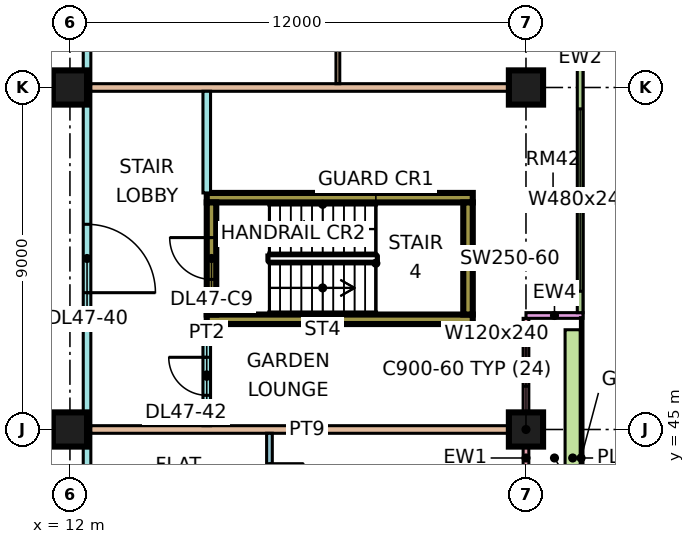
"""IFC4 building model, lengths in metres.
Left out: names, types, materials, properties, quantities, classifications, styles, units other than length and angle.
Written with IfcOpenShell. Run it as: python <this file> out.ifc"""

import sys

from ifc_helpers import new_model, si_unit, direction, frame, frame_2d, origin, origin_2d, place, context, subcontext, project, spatial, rectangle, extrude, element, fill, save


model = new_model("IFC4")
c1 = context("Model", 3, precision=1e-05, world=origin(), true_north=direction((0.0, 1.0)))
c2 = subcontext(c1, "Body", "Model", "MODEL_VIEW")
j1 = project(units=[si_unit("LENGTHUNIT", "METRE"), si_unit("PLANEANGLEUNIT", "RADIAN")], contexts=[c1])
p1 = place(None, origin())
s1 = spatial("IfcSite", under=j1, at=p1, CompositionType="ELEMENT")
p2 = place(p1, origin())
s2 = spatial("IfcBuilding", under=s1, at=p2, CompositionType="ELEMENT")
p3 = place(p2, frame((0.0, 0.0, 202.4)))
s3 = spatial("IfcBuildingStorey", under=s2, at=p3, CompositionType="ELEMENT", Elevation=202.4)
for number, where, z_axis, x_axis in (
    (1, (12.0, 45.0, 0.0), (0.0, 0.0, 1.0), (1.0, 0.0, 0.0)),
    (2, (12.0, 54.0, 0.0), (0.0, 0.0, 1.0), (1.0, 0.0, 0.0)),
    (3, (24.0, 45.0, 0.0), (0.0, 0.0, 1.0), (1.0, 0.0, 0.0)),
    (4, (24.0, 54.0, 0.0), (0.0, 0.0, 1.0), (1.0, 0.0, 0.0)),
):
    element("IfcColumn", number, at=place(p3, frame(where, z_axis=z_axis, x_axis=x_axis)), inside=s3, PredefinedType="COLUMN", context=c2, shape_type="SweptSolid", body=[
        extrude(rectangle(XDim=0.9, YDim=0.9, at=origin_2d()), origin(), (0.0, 0.0, 1.0), 3.75),
    ])
for number, where, z_axis, x_axis in (
    (5, (15.6, 47.9, 0.0), (0.0, 0.0, 1.0), (1.0, 0.0, 0.0)),
    (6, (15.6, 51.1, 0.0), (0.0, 0.0, 1.0), (1.0, 0.0, 0.0)),
):
    element("IfcWall", number, at=place(p3, frame(where, z_axis=z_axis, x_axis=x_axis)), inside=s3, PredefinedType="SHEAR", context=c2, shape_type="SweptSolid", body=[
        extrude(rectangle(XDim=7.0, YDim=0.25, at=frame_2d((3.5, 0.0))), origin(), (0.0, 0.0, 1.0), 3.75),
    ])
p4 = place(p3, frame((15.725, 48.025, 0.0), z_axis=(0.0, 0.0, 1.0), x_axis=(0.0, 1.0, 0.0)))
e7 = element("IfcWall", 7, at=p4, inside=s3, PredefinedType="SHEAR", context=c2, shape_type="SweptSolid", body=[
    extrude(rectangle(XDim=2.95, YDim=0.25, at=frame_2d((1.475, 0.0))), origin(), (0.0, 0.0, 1.0), 3.75),
])
p5 = place(p4, frame((0.925, 0.0, 0.0)))
e8 = element("IfcOpeningElement", 8, at=p5, cuts=e7, PredefinedType="OPENING", context=c2, shape_type="SweptSolid", body=[
    extrude(rectangle(XDim=1.1, YDim=2.2, at=frame_2d((0.55, 1.1))), frame((0.0, 0.135, 0.0), z_axis=(0.0, -1.0, 0.0), x_axis=(1.0, 0.0, 0.0)), (0.0, 0.0, 1.0), 0.27),
])
p6 = place(p3, frame((22.475, 48.025, 0.0), z_axis=(0.0, 0.0, 1.0), x_axis=(0.0, 1.0, 0.0)))
e9 = element("IfcWall", 9, at=p6, inside=s3, PredefinedType="SHEAR", context=c2, shape_type="SweptSolid", body=[
    extrude(rectangle(XDim=2.95, YDim=0.25, at=frame_2d((1.475, 0.0))), origin(), (0.0, 0.0, 1.0), 3.75),
])
p7 = place(p3, frame((24.0, 40.575, 0.0), z_axis=(0.0, 0.0, 1.0), x_axis=(0.0, 1.0, 0.0)))
e10 = element("IfcWall", 10, at=p7, inside=s3, PredefinedType="SOLIDWALL", context=c2, shape_type="SweptSolid", body=[
    extrude(rectangle(XDim=7.35, YDim=0.15, at=frame_2d((3.675, 0.0))), origin(), (0.0, 0.0, 1.0), 3.3),
])
p8 = place(p7, frame((0.262, 0.0, 0.45)))
e11 = element("IfcOpeningElement", 11, at=p8, cuts=e10, PredefinedType="OPENING", context=c2, shape_type="SweptSolid", body=[
    extrude(rectangle(XDim=0.9, YDim=2.4, at=frame_2d((0.45, 1.2))), frame((0.0, 0.085, 0.0), z_axis=(0.0, -1.0, 0.0), x_axis=(1.0, 0.0, 0.0)), (0.0, 0.0, 1.0), 0.17),
])
p9 = place(p7, frame((2.05, 0.0, 0.0)))
e12 = element("IfcOpeningElement", 12, at=p9, cuts=e10, PredefinedType="OPENING", context=c2, shape_type="SweptSolid", body=[
    extrude(rectangle(XDim=1.2, YDim=2.4, at=frame_2d((0.6, 1.2))), frame((0.0, 0.085, 0.0), z_axis=(0.0, -1.0, 0.0), x_axis=(1.0, 0.0, 0.0)), (0.0, 0.0, 1.0), 0.17),
])
p10 = place(p7, frame((5.562, 0.0, 0.45)))
e13 = element("IfcOpeningElement", 13, at=p10, cuts=e10, PredefinedType="OPENING", context=c2, shape_type="SweptSolid", body=[
    extrude(rectangle(XDim=1.2, YDim=2.4, at=frame_2d((0.6, 1.2))), frame((0.0, 0.085, 0.0), z_axis=(0.0, -1.0, 0.0), x_axis=(1.0, 0.0, 0.0)), (0.0, 0.0, 1.0), 0.17),
])
p11 = place(p3, frame((25.5, 48.0, 0.0), z_axis=(0.0, 0.0, 1.0), x_axis=(-1.0, 0.0, 0.0)))
e14 = element("IfcWall", 14, at=p11, inside=s3, PredefinedType="SOLIDWALL", context=c2, shape_type="SweptSolid", body=[
    extrude(rectangle(XDim=1.5, YDim=0.15, at=frame_2d((0.75, 0.0))), origin(), (0.0, 0.0, 1.0), 3.3),
])
p12 = place(p3, frame((25.425, 48.075, 0.0), z_axis=(0.0, 0.0, 1.0), x_axis=(0.0, 1.0, 0.0)))
e15 = element("IfcWall", 15, at=p12, inside=s3, PredefinedType="SOLIDWALL", context=c2, shape_type="SweptSolid", body=[
    extrude(rectangle(XDim=13.425, YDim=0.15, at=frame_2d((6.712, 0.0))), origin(), (0.0, 0.0, 1.0), 3.3),
])
p13 = place(p12, frame((0.562, 0.0, 0.45)))
e16 = element("IfcOpeningElement", 16, at=p13, cuts=e15, PredefinedType="OPENING", context=c2, shape_type="SweptSolid", body=[
    extrude(rectangle(XDim=4.8, YDim=2.4, at=frame_2d((2.4, 1.2))), frame((0.0, 0.085, 0.0), z_axis=(0.0, -1.0, 0.0), x_axis=(1.0, 0.0, 0.0)), (0.0, 0.0, 1.0), 0.17),
])
p14 = place(p12, frame((6.525, 0.0, 0.45)))
e17 = element("IfcOpeningElement", 17, at=p14, cuts=e15, PredefinedType="OPENING", context=c2, shape_type="SweptSolid", body=[
    extrude(rectangle(XDim=1.8, YDim=2.4, at=frame_2d((0.9, 1.2))), frame((0.0, 0.085, 0.0), z_axis=(0.0, -1.0, 0.0), x_axis=(1.0, 0.0, 0.0)), (0.0, 0.0, 1.0), 0.17),
])
p15 = place(p12, frame((9.525, 0.0, 0.45)))
e18 = element("IfcOpeningElement", 18, at=p15, cuts=e15, PredefinedType="OPENING", context=c2, shape_type="SweptSolid", body=[
    extrude(rectangle(XDim=1.8, YDim=2.4, at=frame_2d((0.9, 1.2))), frame((0.0, 0.085, 0.0), z_axis=(0.0, -1.0, 0.0), x_axis=(1.0, 0.0, 0.0)), (0.0, 0.0, 1.0), 0.17),
])
p16 = place(p12, frame((12.225, 0.0, 0.45)))
e19 = element("IfcOpeningElement", 19, at=p16, cuts=e15, PredefinedType="OPENING", context=c2, shape_type="SweptSolid", body=[
    extrude(rectangle(XDim=0.9, YDim=2.4, at=frame_2d((0.45, 1.2))), frame((0.0, 0.085, 0.0), z_axis=(0.0, -1.0, 0.0), x_axis=(1.0, 0.0, 0.0)), (0.0, 0.0, 1.0), 0.17),
])
p17 = place(p3, frame((25.229, 40.875, 0.0), z_axis=(0.0, 0.0, 1.0), x_axis=(0.0, 1.0, 0.0)))
e20 = element("IfcWall", 20, at=p17, inside=s3, PredefinedType="SOLIDWALL", context=c2, shape_type="SweptSolid", body=[
    extrude(rectangle(XDim=6.75, YDim=0.4, at=frame_2d((3.375, 0.0))), origin(), (0.0, 0.0, 1.0), 0.7),
])
p18 = place(p3, frame((12.45, 20.0, 0.0), z_axis=(0.0, 0.0, 1.0), x_axis=(0.0, 1.0, 0.0)))
e21 = element("IfcWall", 21, at=p18, inside=s3, PredefinedType="PARTITIONING", context=c2, shape_type="SweptSolid", body=[
    extrude(rectangle(XDim=42.926, YDim=0.2, at=frame_2d((21.463, 0.0))), origin(), (0.0, 0.0, 1.0), 3.3),
])
p19 = place(p18, frame((7.15, 0.0, 0.0)))
e22 = element("IfcOpeningElement", 22, at=p19, cuts=e21, PredefinedType="OPENING", context=c2, shape_type="SweptSolid", body=[
    extrude(rectangle(XDim=1.6, YDim=2.1, at=frame_2d((0.8, 1.05))), frame((0.0, 0.11, 0.0), z_axis=(0.0, -1.0, 0.0), x_axis=(1.0, 0.0, 0.0)), (0.0, 0.0, 1.0), 0.22),
])
p20 = place(p18, frame((13.5, 0.0, 0.0)))
e23 = element("IfcOpeningElement", 23, at=p20, cuts=e21, PredefinedType="OPENING", context=c2, shape_type="SweptSolid", body=[
    extrude(rectangle(XDim=1.0, YDim=2.1, at=frame_2d((0.5, 1.05))), frame((0.0, 0.11, 0.0), z_axis=(0.0, -1.0, 0.0), x_axis=(1.0, 0.0, 0.0)), (0.0, 0.0, 1.0), 0.22),
])
p21 = place(p18, frame((17.2, 0.0, 0.0)))
e24 = element("IfcOpeningElement", 24, at=p21, cuts=e21, PredefinedType="OPENING", context=c2, shape_type="SweptSolid", body=[
    extrude(rectangle(XDim=1.0, YDim=2.1, at=frame_2d((0.5, 1.05))), frame((0.0, 0.11, 0.0), z_axis=(0.0, -1.0, 0.0), x_axis=(1.0, 0.0, 0.0)), (0.0, 0.0, 1.0), 0.22),
])
p22 = place(p18, frame((35.2, 0.0, 0.0)))
e25 = element("IfcOpeningElement", 25, at=p22, cuts=e21, PredefinedType="OPENING", context=c2, shape_type="SweptSolid", body=[
    extrude(rectangle(XDim=1.0, YDim=2.1, at=frame_2d((0.5, 1.05))), frame((0.0, 0.11, 0.0), z_axis=(0.0, -1.0, 0.0), x_axis=(1.0, 0.0, 0.0)), (0.0, 0.0, 1.0), 0.22),
])
p23 = place(p18, frame((1.15, 0.0, 0.0)))
e26 = element("IfcOpeningElement", 26, at=p23, cuts=e21, PredefinedType="OPENING", context=c2, shape_type="SweptSolid", body=[
    extrude(rectangle(XDim=1.8, YDim=2.1, at=frame_2d((0.9, 1.05))), frame((0.0, 0.11, 0.0), z_axis=(0.0, -1.0, 0.0), x_axis=(1.0, 0.0, 0.0)), (0.0, 0.0, 1.0), 0.22),
])
p24 = place(p18, frame((28.6, 0.0, 0.0)))
e27 = element("IfcOpeningElement", 27, at=p24, cuts=e21, PredefinedType="OPENING", context=c2, shape_type="SweptSolid", body=[
    extrude(rectangle(XDim=1.8, YDim=2.1, at=frame_2d((0.9, 1.05))), frame((0.0, 0.11, 0.0), z_axis=(0.0, -1.0, 0.0), x_axis=(1.0, 0.0, 0.0)), (0.0, 0.0, 1.0), 0.22),
])
p25 = place(p3, frame((12.55, 45.0, 0.0), z_axis=(0.0, 0.0, 1.0), x_axis=(1.0, 0.0, 0.0)))
e28 = element("IfcWall", 28, at=p25, inside=s3, PredefinedType="PARTITIONING", context=c2, shape_type="SweptSolid", body=[
    extrude(rectangle(XDim=11.376, YDim=0.2, at=frame_2d((5.688, 0.0))), origin(), (0.0, 0.0, 1.0), 3.3),
])
p26 = place(p3, frame((12.55, 54.0, 0.0), z_axis=(0.0, 0.0, 1.0), x_axis=(1.0, 0.0, 0.0)))
e29 = element("IfcWall", 29, at=p26, inside=s3, PredefinedType="PARTITIONING", context=c2, shape_type="SweptSolid", body=[
    extrude(rectangle(XDim=11.45, YDim=0.2, at=frame_2d((5.725, 0.0))), origin(), (0.0, 0.0, 1.0), 3.3),
])
p27 = place(p3, frame((15.6, 45.1, 0.0), z_axis=(0.0, 0.0, 1.0), x_axis=(0.0, 1.0, 0.0)))
e30 = element("IfcWall", 30, at=p27, inside=s3, PredefinedType="PARTITIONING", context=c2, shape_type="SweptSolid", body=[
    extrude(rectangle(XDim=2.675, YDim=0.2, at=frame_2d((1.337, 0.0))), origin(), (0.0, 0.0, 1.0), 3.3),
])
p28 = place(p27, frame((0.8, 0.0, 0.0)))
e31 = element("IfcOpeningElement", 31, at=p28, cuts=e30, PredefinedType="OPENING", context=c2, shape_type="SweptSolid", body=[
    extrude(rectangle(XDim=1.0, YDim=2.1, at=frame_2d((0.5, 1.05))), frame((0.0, 0.11, 0.0), z_axis=(0.0, -1.0, 0.0), x_axis=(1.0, 0.0, 0.0)), (0.0, 0.0, 1.0), 0.22),
])
p29 = place(p3, frame((15.6, 51.225, 0.0), z_axis=(0.0, 0.0, 1.0), x_axis=(0.0, 1.0, 0.0)))
e32 = element("IfcWall", 32, at=p29, inside=s3, PredefinedType="PARTITIONING", context=c2, shape_type="SweptSolid", body=[
    extrude(rectangle(XDim=2.675, YDim=0.2, at=frame_2d((1.337, 0.0))), origin(), (0.0, 0.0, 1.0), 3.3),
])
p30 = place(p3, frame((17.25, 39.225, 0.0), z_axis=(0.0, 0.0, 1.0), x_axis=(0.0, 1.0, 0.0)))
e33 = element("IfcWall", 33, at=p30, inside=s3, PredefinedType="PARTITIONING", context=c2, shape_type="SweptSolid", body=[
    extrude(rectangle(XDim=5.675, YDim=0.15, at=frame_2d((2.837, 0.0))), origin(), (0.0, 0.0, 1.0), 3.3),
])
p31 = place(p30, frame((1.225, 0.0, 0.0)))
e34 = element("IfcOpeningElement", 34, at=p31, cuts=e33, PredefinedType="OPENING", context=c2, shape_type="SweptSolid", body=[
    extrude(rectangle(XDim=0.8, YDim=2.1, at=frame_2d((0.4, 1.05))), frame((0.0, 0.085, 0.0), z_axis=(0.0, -1.0, 0.0), x_axis=(1.0, 0.0, 0.0)), (0.0, 0.0, 1.0), 0.17),
])
p32 = place(p30, frame((3.975, 0.0, 0.0)))
e35 = element("IfcOpeningElement", 35, at=p32, cuts=e33, PredefinedType="OPENING", context=c2, shape_type="SweptSolid", body=[
    extrude(rectangle(XDim=0.9, YDim=2.1, at=frame_2d((0.45, 1.05))), frame((0.0, 0.085, 0.0), z_axis=(0.0, -1.0, 0.0), x_axis=(1.0, 0.0, 0.0)), (0.0, 0.0, 1.0), 0.17),
])
p33 = place(p3, frame((19.05, 54.1, 0.0), z_axis=(0.0, 0.0, 1.0), x_axis=(0.0, 1.0, 0.0)))
e36 = element("IfcWall", 36, at=p33, inside=s3, PredefinedType="PARTITIONING", context=c2, shape_type="SweptSolid", body=[
    extrude(rectangle(XDim=2.85, YDim=0.1, at=frame_2d((1.425, 0.0))), origin(), (0.0, 0.0, 1.0), 3.3),
])
p34 = place(p33, frame((0.95, 0.0, 0.0)))
e37 = element("IfcOpeningElement", 37, at=p34, cuts=e36, PredefinedType="OPENING", context=c2, shape_type="SweptSolid", body=[
    extrude(rectangle(XDim=0.9, YDim=2.1, at=frame_2d((0.45, 1.05))), frame((0.0, 0.06, 0.0), z_axis=(0.0, -1.0, 0.0), x_axis=(1.0, 0.0, 0.0)), (0.0, 0.0, 1.0), 0.12),
])
p35 = place(p10, origin())
e38 = element("IfcWindow", 38, at=p35, inside=s3, PartitioningType="SINGLE_PANEL", PredefinedType="WINDOW", context=c2, shape_type="SweptSolid", body=[
    extrude(rectangle(XDim=1.2, YDim=2.4, at=frame_2d((0.6, 1.2))), frame((0.0, 0.03, 0.0), z_axis=(0.0, -1.0, 0.0), x_axis=(1.0, 0.0, 0.0)), (0.0, 0.0, 1.0), 0.06),
])
fill(e13, e38)
p36 = place(p13, origin())
e39 = element("IfcWindow", 39, at=p36, inside=s3, PartitioningType="SINGLE_PANEL", PredefinedType="WINDOW", context=c2, shape_type="SweptSolid", body=[
    extrude(rectangle(XDim=4.8, YDim=2.4, at=frame_2d((2.4, 1.2))), frame((0.0, 0.03, 0.0), z_axis=(0.0, -1.0, 0.0), x_axis=(1.0, 0.0, 0.0)), (0.0, 0.0, 1.0), 0.06),
])
fill(e16, e39)
p37 = place(p14, origin())
e40 = element("IfcWindow", 40, at=p37, inside=s3, PartitioningType="SINGLE_PANEL", PredefinedType="WINDOW", context=c2, shape_type="SweptSolid", body=[
    extrude(rectangle(XDim=1.8, YDim=2.4, at=frame_2d((0.9, 1.2))), frame((0.0, 0.03, 0.0), z_axis=(0.0, -1.0, 0.0), x_axis=(1.0, 0.0, 0.0)), (0.0, 0.0, 1.0), 0.06),
])
fill(e17, e40)
p38 = place(p5, frame((1.1, 0.0, 0.0), z_axis=(0.0, 0.0, 1.0), x_axis=(-1.0, 0.0, 0.0)))
e41 = element("IfcDoor", 41, at=p38, inside=s3, OperationType="SINGLE_SWING_RIGHT", PredefinedType="DOOR", context=c2, shape_type="SweptSolid", body=[
    extrude(rectangle(XDim=1.1, YDim=2.2, at=frame_2d((0.55, 1.1))), frame((0.0, 0.025, 0.0), z_axis=(0.0, -1.0, 0.0), x_axis=(1.0, 0.0, 0.0)), (0.0, 0.0, 1.0), 0.05),
])
fill(e8, e41)
p39 = place(p32, origin())
e42 = element("IfcDoor", 42, at=p39, inside=s3, OperationType="SINGLE_SWING_RIGHT", PredefinedType="DOOR", context=c2, shape_type="SweptSolid", body=[
    extrude(rectangle(XDim=0.9, YDim=2.1, at=frame_2d((0.45, 1.05))), frame((0.0, 0.025, 0.0), z_axis=(0.0, -1.0, 0.0), x_axis=(1.0, 0.0, 0.0)), (0.0, 0.0, 1.0), 0.05),
])
fill(e35, e42)
p40 = place(p24, frame((1.8, 0.0, 0.0), z_axis=(0.0, 0.0, 1.0), x_axis=(-1.0, 0.0, 0.0)))
e43 = element("IfcDoor", 43, at=p40, inside=s3, OperationType="DOUBLE_DOOR_SINGLE_SWING", PredefinedType="DOOR", context=c2, shape_type="SweptSolid", body=[
    extrude(rectangle(XDim=1.8, YDim=2.1, at=frame_2d((0.9, 1.05))), frame((0.0, 0.025, 0.0), z_axis=(0.0, -1.0, 0.0), x_axis=(1.0, 0.0, 0.0)), (0.0, 0.0, 1.0), 0.05),
])
fill(e27, e43)
p41 = place(p28, frame((1.0, 0.0, 0.0), z_axis=(0.0, 0.0, 1.0), x_axis=(-1.0, 0.0, 0.0)))
e44 = element("IfcDoor", 44, at=p41, inside=s3, OperationType="SINGLE_SWING_RIGHT", PredefinedType="DOOR", context=c2, shape_type="SweptSolid", body=[
    extrude(rectangle(XDim=1.0, YDim=2.1, at=frame_2d((0.5, 1.05))), frame((0.0, 0.025, 0.0), z_axis=(0.0, -1.0, 0.0), x_axis=(1.0, 0.0, 0.0)), (0.0, 0.0, 1.0), 0.05),
])
fill(e31, e44)
save(model, sys.argv[1])
